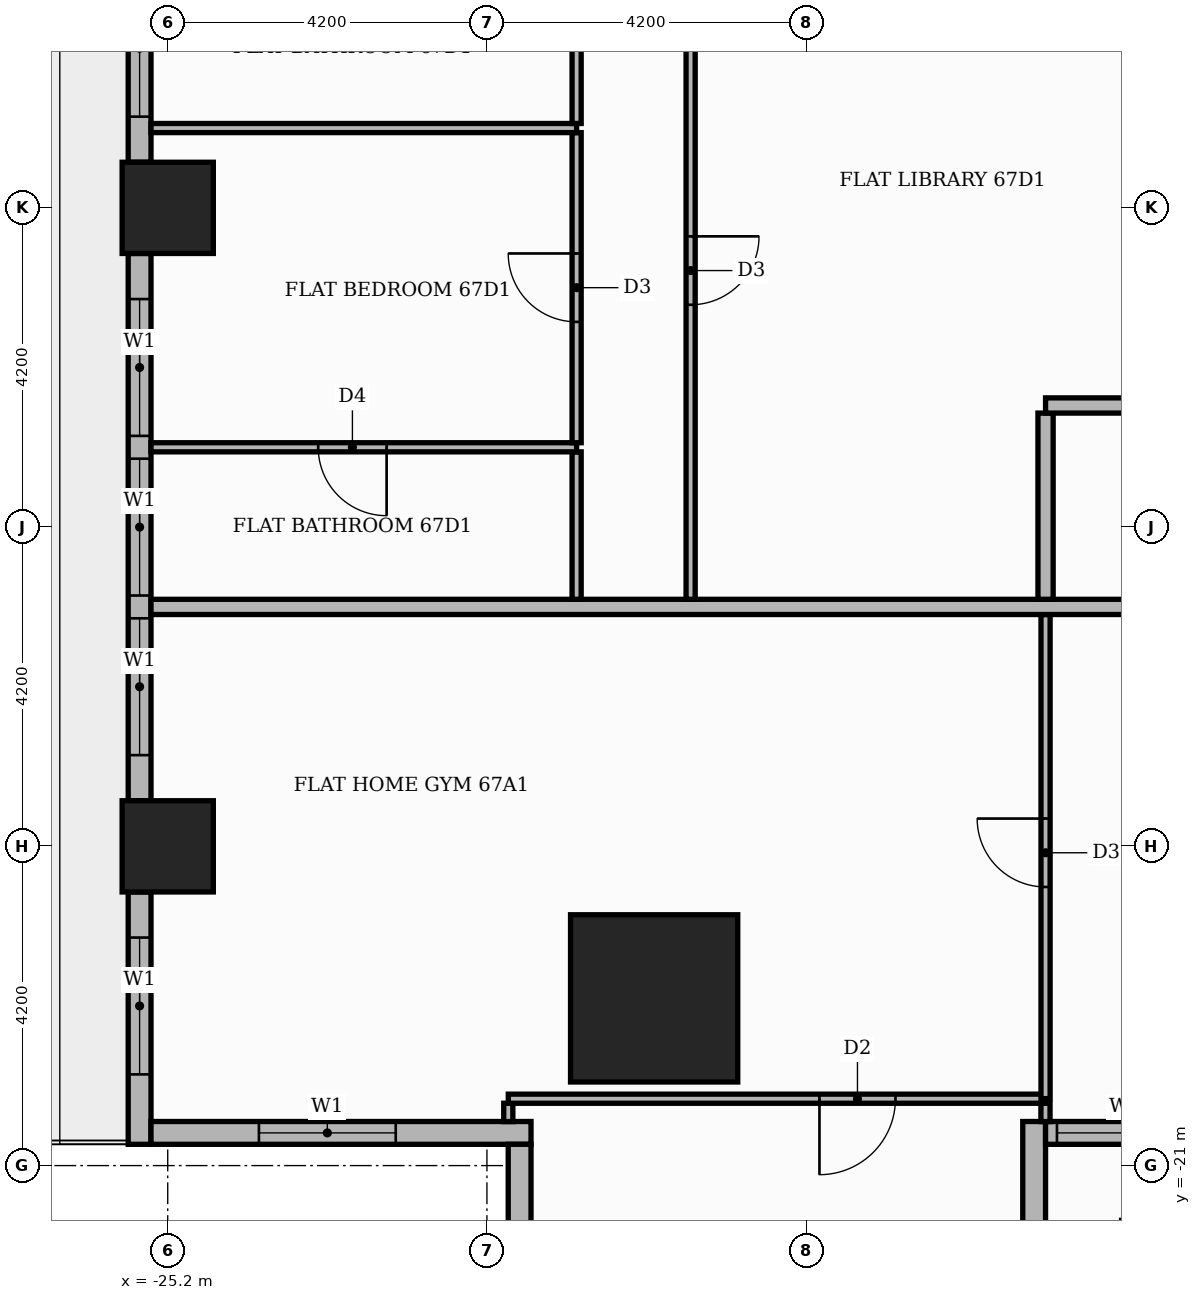
"""IFC4 building model, lengths in metres.
Left out: names, types, materials, properties, quantities, classifications, styles, units other than length and angle.
Written with IfcOpenShell. Run it as: python <this file> out.ifc"""

import sys

from ifc_helpers import new_model, si_unit, direction, frame, frame_2d, origin, origin_2d, place, context, subcontext, project, spatial, rectangle, extrude, element, fill, save


model = new_model("IFC4")
c1 = context("Model", 3, precision=1e-05, world=origin(), true_north=direction((0.0, 1.0)))
c2 = subcontext(c1, "Body", "Model", "MODEL_VIEW")
j1 = project(units=[si_unit("LENGTHUNIT", "METRE"), si_unit("PLANEANGLEUNIT", "RADIAN")], contexts=[c1])
p1 = place(None, origin())
s1 = spatial("IfcSite", under=j1, at=p1, CompositionType="ELEMENT")
p2 = place(p1, origin())
s2 = spatial("IfcBuilding", under=s1, at=p2, CompositionType="ELEMENT")
p3 = place(p2, frame((0.0, 0.0, 279.6)))
s3 = spatial("IfcBuildingStorey", under=s2, at=p3, CompositionType="ELEMENT", Elevation=279.6)
p4 = place(p3, frame((-18.8, -18.8, 0.0), z_axis=(0.0, 0.0, 1.0), x_axis=(1.0, 0.0, 0.0)))
e1 = element("IfcColumn", 1, at=p4, inside=s3, PredefinedType="COLUMN", context=c2, shape_type="SweptSolid", body=[
    extrude(rectangle(XDim=2.2, YDim=2.2, at=origin_2d()), origin(), (0.0, 0.0, 1.0), 3.9),
])
for number, where, z_axis, x_axis in (
    (2, (-25.2, -8.4, 0.0), (0.0, 0.0, 1.0), (1.0, 0.0, 0.0)),
    (3, (-25.2, -16.8, 0.0), (0.0, 0.0, 1.0), (1.0, 0.0, 0.0)),
):
    element("IfcColumn", number, at=place(p3, frame(where, z_axis=z_axis, x_axis=x_axis)), inside=s3, PredefinedType="COLUMN", context=c2, shape_type="SweptSolid", body=[
        extrude(rectangle(XDim=1.2, YDim=1.2, at=origin_2d()), origin(), (0.0, 0.0, 1.0), 3.9),
    ])
p5 = place(p3, frame((-25.57, -0.6, 0.0), z_axis=(0.0, 0.0, 1.0), x_axis=(0.0, -1.0, 0.0)))
e4 = element("IfcWall", 4, at=p5, inside=s3, PredefinedType="STANDARD", context=c2, shape_type="SweptSolid", body=[
    extrude(rectangle(XDim=7.2, YDim=0.3, at=frame_2d((3.6, 0.0))), origin(), (0.0, 0.0, 1.0), 3.48),
])
p6 = place(p5, frame((0.6, 0.0, 0.9)))
e5 = element("IfcOpeningElement", 5, at=p6, cuts=e4, PredefinedType="OPENING", context=c2, shape_type="SweptSolid", body=[
    extrude(rectangle(XDim=3.9, YDim=2.1, at=frame_2d((1.95, 1.05))), frame((0.0, 0.16, 0.0), z_axis=(0.0, -1.0, 0.0), x_axis=(1.0, 0.0, 0.0)), (0.0, 0.0, 1.0), 0.32),
])
p7 = place(p5, frame((4.8, 0.0, 0.9)))
e6 = element("IfcOpeningElement", 6, at=p7, cuts=e4, PredefinedType="OPENING", context=c2, shape_type="SweptSolid", body=[
    extrude(rectangle(XDim=1.8, YDim=2.1, at=frame_2d((0.9, 1.05))), frame((0.0, 0.16, 0.0), z_axis=(0.0, -1.0, 0.0), x_axis=(1.0, 0.0, 0.0)), (0.0, 0.0, 1.0), 0.32),
])
p8 = place(p3, frame((-25.57, -9.0, 0.0), z_axis=(0.0, 0.0, 1.0), x_axis=(0.0, -1.0, 0.0)))
e7 = element("IfcWall", 7, at=p8, inside=s3, PredefinedType="STANDARD", context=c2, shape_type="SweptSolid", body=[
    extrude(rectangle(XDim=7.2, YDim=0.3, at=frame_2d((3.6, 0.0))), origin(), (0.0, 0.0, 1.0), 3.48),
])
p9 = place(p8, frame((0.6, 0.0, 0.9)))
e8 = element("IfcOpeningElement", 8, at=p9, cuts=e7, PredefinedType="OPENING", context=c2, shape_type="SweptSolid", body=[
    extrude(rectangle(XDim=1.8, YDim=2.1, at=frame_2d((0.9, 1.05))), frame((0.0, 0.16, 0.0), z_axis=(0.0, -1.0, 0.0), x_axis=(1.0, 0.0, 0.0)), (0.0, 0.0, 1.0), 0.32),
])
p10 = place(p8, frame((2.7, 0.0, 0.9)))
e9 = element("IfcOpeningElement", 9, at=p10, cuts=e7, PredefinedType="OPENING", context=c2, shape_type="SweptSolid", body=[
    extrude(rectangle(XDim=1.8, YDim=2.1, at=frame_2d((0.9, 1.05))), frame((0.0, 0.16, 0.0), z_axis=(0.0, -1.0, 0.0), x_axis=(1.0, 0.0, 0.0)), (0.0, 0.0, 1.0), 0.32),
])
p11 = place(p8, frame((4.8, 0.0, 0.9)))
e10 = element("IfcOpeningElement", 10, at=p11, cuts=e7, PredefinedType="OPENING", context=c2, shape_type="SweptSolid", body=[
    extrude(rectangle(XDim=1.8, YDim=2.1, at=frame_2d((0.9, 1.05))), frame((0.0, 0.16, 0.0), z_axis=(0.0, -1.0, 0.0), x_axis=(1.0, 0.0, 0.0)), (0.0, 0.0, 1.0), 0.32),
])
p12 = place(p3, frame((-25.57, -17.4, 0.0), z_axis=(0.0, 0.0, 1.0), x_axis=(0.0, -1.0, 0.0)))
e11 = element("IfcWall", 11, at=p12, inside=s3, PredefinedType="STANDARD", context=c2, shape_type="SweptSolid", body=[
    extrude(rectangle(XDim=3.32, YDim=0.3, at=frame_2d((1.66, 0.0))), origin(), (0.0, 0.0, 1.0), 3.48),
])
p13 = place(p12, frame((0.6, 0.0, 0.9)))
e12 = element("IfcOpeningElement", 12, at=p13, cuts=e11, PredefinedType="OPENING", context=c2, shape_type="SweptSolid", body=[
    extrude(rectangle(XDim=1.8, YDim=2.1, at=frame_2d((0.9, 1.05))), frame((0.0, 0.16, 0.0), z_axis=(0.0, -1.0, 0.0), x_axis=(1.0, 0.0, 0.0)), (0.0, 0.0, 1.0), 0.32),
])
p14 = place(p3, frame((-25.42, -20.57, 0.0), z_axis=(0.0, 0.0, 1.0), x_axis=(1.0, 0.0, 0.0)))
e13 = element("IfcWall", 13, at=p14, inside=s3, PredefinedType="STANDARD", context=c2, shape_type="SweptSolid", body=[
    extrude(rectangle(XDim=5.0, YDim=0.3, at=frame_2d((2.5, 0.0))), origin(), (0.0, 0.0, 1.0), 3.48),
])
p15 = place(p14, frame((1.42, 0.0, 0.9)))
e14 = element("IfcOpeningElement", 14, at=p15, cuts=e13, PredefinedType="OPENING", context=c2, shape_type="SweptSolid", body=[
    extrude(rectangle(XDim=1.8, YDim=2.1, at=frame_2d((0.9, 1.05))), frame((0.0, 0.16, 0.0), z_axis=(0.0, -1.0, 0.0), x_axis=(1.0, 0.0, 0.0)), (0.0, 0.0, 1.0), 0.32),
])
p16 = place(p3, frame((-20.57, -20.72, 0.0), z_axis=(0.0, 0.0, 1.0), x_axis=(0.0, -1.0, 0.0)))
e15 = element("IfcWall", 15, at=p16, inside=s3, PredefinedType="STANDARD", context=c2, shape_type="SweptSolid", body=[
    extrude(rectangle(XDim=5.0, YDim=0.3, at=frame_2d((2.5, 0.0))), origin(), (0.0, 0.0, 1.0), 3.48),
])
p17 = place(p16, frame((1.48, 0.0, 0.9)))
e16 = element("IfcOpeningElement", 16, at=p17, cuts=e15, PredefinedType="OPENING", context=c2, shape_type="SweptSolid", body=[
    extrude(rectangle(XDim=1.8, YDim=2.1, at=frame_2d((0.9, 1.05))), frame((0.0, 0.16, 0.0), z_axis=(0.0, -1.0, 0.0), x_axis=(1.0, 0.0, 0.0)), (0.0, 0.0, 1.0), 0.32),
])
p18 = place(p3, frame((-13.8, -25.42, 0.0), z_axis=(0.0, 0.0, 1.0), x_axis=(0.0, 1.0, 0.0)))
e17 = element("IfcWall", 17, at=p18, inside=s3, PredefinedType="STANDARD", context=c2, shape_type="SweptSolid", body=[
    extrude(rectangle(XDim=5.0, YDim=0.3, at=frame_2d((2.5, 0.0))), origin(), (0.0, 0.0, 1.0), 3.48),
])
p19 = place(p18, frame((1.42, 0.0, 0.0)))
e18 = element("IfcOpeningElement", 18, at=p19, cuts=e17, PredefinedType="OPENING", context=c2, shape_type="SweptSolid", body=[
    extrude(rectangle(XDim=1.8, YDim=2.4, at=frame_2d((0.9, 1.2))), frame((0.0, 0.16, 0.0), z_axis=(0.0, -1.0, 0.0), x_axis=(1.0, 0.0, 0.0)), (0.0, 0.0, 1.0), 0.32),
])
p20 = place(p3, frame((-13.65, -20.57, 0.0), z_axis=(0.0, 0.0, 1.0), x_axis=(1.0, 0.0, 0.0)))
e19 = element("IfcWall", 19, at=p20, inside=s3, PredefinedType="STANDARD", context=c2, shape_type="SweptSolid", body=[
    extrude(rectangle(XDim=27.6, YDim=0.3, at=frame_2d((13.8, 0.0))), origin(), (0.0, 0.0, 1.0), 3.48),
])
p21 = place(p20, frame((0.15, 0.0, 0.9)))
e20 = element("IfcOpeningElement", 20, at=p21, cuts=e19, PredefinedType="OPENING", context=c2, shape_type="SweptSolid", body=[
    extrude(rectangle(XDim=1.8, YDim=2.1, at=frame_2d((0.9, 1.05))), frame((0.0, 0.16, 0.0), z_axis=(0.0, -1.0, 0.0), x_axis=(1.0, 0.0, 0.0)), (0.0, 0.0, 1.0), 0.32),
])
p22 = place(p20, frame((2.25, 0.0, 0.9)))
e21 = element("IfcOpeningElement", 21, at=p22, cuts=e19, PredefinedType="OPENING", context=c2, shape_type="SweptSolid", body=[
    extrude(rectangle(XDim=6.0, YDim=2.1, at=frame_2d((3.0, 1.05))), frame((0.0, 0.16, 0.0), z_axis=(0.0, -1.0, 0.0), x_axis=(1.0, 0.0, 0.0)), (0.0, 0.0, 1.0), 0.32),
])
p23 = place(p20, frame((8.55, 0.0, 0.9)))
e22 = element("IfcOpeningElement", 22, at=p23, cuts=e19, PredefinedType="OPENING", context=c2, shape_type="SweptSolid", body=[
    extrude(rectangle(XDim=6.0, YDim=2.1, at=frame_2d((3.0, 1.05))), frame((0.0, 0.16, 0.0), z_axis=(0.0, -1.0, 0.0), x_axis=(1.0, 0.0, 0.0)), (0.0, 0.0, 1.0), 0.32),
])
p24 = place(p20, frame((14.85, 0.0, 0.9)))
e23 = element("IfcOpeningElement", 23, at=p24, cuts=e19, PredefinedType="OPENING", context=c2, shape_type="SweptSolid", body=[
    extrude(rectangle(XDim=6.0, YDim=2.1, at=frame_2d((3.0, 1.05))), frame((0.0, 0.16, 0.0), z_axis=(0.0, -1.0, 0.0), x_axis=(1.0, 0.0, 0.0)), (0.0, 0.0, 1.0), 0.32),
])
p25 = place(p20, frame((21.15, 0.0, 0.9)))
e24 = element("IfcOpeningElement", 24, at=p25, cuts=e19, PredefinedType="OPENING", context=c2, shape_type="SweptSolid", body=[
    extrude(rectangle(XDim=6.0, YDim=2.1, at=frame_2d((3.0, 1.05))), frame((0.0, 0.16, 0.0), z_axis=(0.0, -1.0, 0.0), x_axis=(1.0, 0.0, 0.0)), (0.0, 0.0, 1.0), 0.32),
])
for number, where, z_axis, x_axis in (
    (25, (-20.719, -20.421, 0.0), (0.0, 0.0, 1.0), (0.0, 1.0, 0.0)),
    (26, (-13.651, -20.421, 0.0), (0.0, 0.0, 1.0), (0.0, 1.0, 0.0)),
):
    element("IfcWall", number, at=place(p3, frame(where, z_axis=z_axis, x_axis=x_axis)), inside=s3, PredefinedType="PARTITIONING", context=c2, shape_type="SweptSolid", body=[
        extrude(rectangle(XDim=0.241, YDim=0.12, at=frame_2d((0.121, 0.0))), origin(), (0.0, 0.0, 1.0), 3.48),
    ])
p26 = place(p3, frame((-20.719, -20.12, 0.0), z_axis=(0.0, 0.0, 1.0), x_axis=(1.0, 0.0, 0.0)))
e27 = element("IfcWall", 27, at=p26, inside=s3, PredefinedType="PARTITIONING", context=c2, shape_type="SweptSolid", body=[
    extrude(rectangle(XDim=7.068, YDim=0.12, at=frame_2d((3.534, 0.0))), origin(), (0.0, 0.0, 1.0), 3.48),
])
p27 = place(p26, frame((4.094, 0.0, 0.0)))
e28 = element("IfcOpeningElement", 28, at=p27, cuts=e27, PredefinedType="OPENING", context=c2, shape_type="SweptSolid", body=[
    extrude(rectangle(XDim=1.0, YDim=2.1, at=frame_2d((0.5, 1.05))), frame((0.0, 0.07, 0.0), z_axis=(0.0, -1.0, 0.0), x_axis=(1.0, 0.0, 0.0)), (0.0, 0.0, 1.0), 0.14),
])
p28 = place(p3, frame((-13.65, -20.119, 0.0), z_axis=(0.0, 0.0, 1.0), x_axis=(0.0, 1.0, 0.0)))
e29 = element("IfcWall", 29, at=p28, inside=s3, PredefinedType="PARTITIONING", context=c2, shape_type="SweptSolid", body=[
    extrude(rectangle(XDim=6.369, YDim=0.12, at=frame_2d((3.185, 0.0))), origin(), (0.0, 0.0, 1.0), 3.48),
])
p29 = place(p28, frame((2.784, 0.0, 0.0)))
e30 = element("IfcOpeningElement", 30, at=p29, cuts=e29, PredefinedType="OPENING", context=c2, shape_type="SweptSolid", body=[
    extrude(rectangle(XDim=0.9, YDim=2.1, at=frame_2d((0.45, 1.05))), frame((0.0, 0.07, 0.0), z_axis=(0.0, -1.0, 0.0), x_axis=(1.0, 0.0, 0.0)), (0.0, 0.0, 1.0), 0.14),
])
p30 = place(p3, frame((-25.42, -13.65, 0.0), z_axis=(0.0, 0.0, 1.0), x_axis=(1.0, 0.0, 0.0)))
e31 = element("IfcWall", 31, at=p30, inside=s3, PredefinedType="PARTITIONING", context=c2, shape_type="SweptSolid", body=[
    extrude(rectangle(XDim=39.07, YDim=0.2, at=frame_2d((19.535, 0.0))), origin(), (0.0, 0.0, 1.0), 3.48),
])
p31 = place(p30, frame((14.37, 0.0, 0.0)))
e32 = element("IfcOpeningElement", 32, at=p31, cuts=e31, PredefinedType="OPENING", context=c2, shape_type="SweptSolid", body=[
    extrude(rectangle(XDim=1.1, YDim=2.4, at=frame_2d((0.55, 1.2))), frame((0.0, 0.11, 0.0), z_axis=(0.0, -1.0, 0.0), x_axis=(1.0, 0.0, 0.0)), (0.0, 0.0, 1.0), 0.22),
])
p32 = place(p3, frame((-19.82, -13.55, 0.0), z_axis=(0.0, 0.0, 1.0), x_axis=(0.0, 1.0, 0.0)))
e33 = element("IfcWall", 33, at=p32, inside=s3, PredefinedType="PARTITIONING", context=c2, shape_type="SweptSolid", body=[
    extrude(rectangle(XDim=1.94, YDim=0.12, at=frame_2d((0.97, 0.0))), origin(), (0.0, 0.0, 1.0), 3.48),
])
p33 = place(p3, frame((-18.32, -13.55, 0.0), z_axis=(0.0, 0.0, 1.0), x_axis=(0.0, 1.0, 0.0)))
e34 = element("IfcWall", 34, at=p33, inside=s3, PredefinedType="PARTITIONING", context=c2, shape_type="SweptSolid", body=[
    extrude(rectangle(XDim=8.69, YDim=0.12, at=frame_2d((4.345, 0.0))), origin(), (0.0, 0.0, 1.0), 3.48),
])
p34 = place(p33, frame((3.875, 0.0, 0.0)))
e35 = element("IfcOpeningElement", 35, at=p34, cuts=e34, PredefinedType="OPENING", context=c2, shape_type="SweptSolid", body=[
    extrude(rectangle(XDim=0.9, YDim=2.1, at=frame_2d((0.45, 1.05))), frame((0.0, 0.07, 0.0), z_axis=(0.0, -1.0, 0.0), x_axis=(1.0, 0.0, 0.0)), (0.0, 0.0, 1.0), 0.14),
])
p35 = place(p3, frame((-13.65, -13.55, 0.0), z_axis=(0.0, 0.0, 1.0), x_axis=(0.0, 1.0, 0.0)))
e36 = element("IfcWall", 36, at=p35, inside=s3, PredefinedType="PARTITIONING", context=c2, shape_type="SweptSolid", body=[
    extrude(rectangle(XDim=2.45, YDim=0.2, at=frame_2d((1.225, 0.0))), origin(), (0.0, 0.0, 1.0), 3.48),
])
p36 = place(p3, frame((-25.42, -11.55, 0.0), z_axis=(0.0, 0.0, 1.0), x_axis=(1.0, 0.0, 0.0)))
e37 = element("IfcWall", 37, at=p36, inside=s3, PredefinedType="PARTITIONING", context=c2, shape_type="SweptSolid", body=[
    extrude(rectangle(XDim=5.6, YDim=0.12, at=frame_2d((2.8, 0.0))), origin(), (0.0, 0.0, 1.0), 3.48),
])
p37 = place(p36, frame((2.2, 0.0, 0.0)))
e38 = element("IfcOpeningElement", 38, at=p37, cuts=e37, PredefinedType="OPENING", context=c2, shape_type="SweptSolid", body=[
    extrude(rectangle(XDim=0.9, YDim=2.1, at=frame_2d((0.45, 1.05))), frame((0.0, 0.07, 0.0), z_axis=(0.0, -1.0, 0.0), x_axis=(1.0, 0.0, 0.0)), (0.0, 0.0, 1.0), 0.14),
])
p38 = place(p3, frame((-19.82, -11.49, 0.0), z_axis=(0.0, 0.0, 1.0), x_axis=(0.0, 1.0, 0.0)))
e39 = element("IfcWall", 39, at=p38, inside=s3, PredefinedType="PARTITIONING", context=c2, shape_type="SweptSolid", body=[
    extrude(rectangle(XDim=4.08, YDim=0.12, at=frame_2d((2.04, 0.0))), origin(), (0.0, 0.0, 1.0), 3.48),
])
p39 = place(p38, frame((1.59, 0.0, 0.0)))
e40 = element("IfcOpeningElement", 40, at=p39, cuts=e39, PredefinedType="OPENING", context=c2, shape_type="SweptSolid", body=[
    extrude(rectangle(XDim=0.9, YDim=2.1, at=frame_2d((0.45, 1.05))), frame((0.0, 0.07, 0.0), z_axis=(0.0, -1.0, 0.0), x_axis=(1.0, 0.0, 0.0)), (0.0, 0.0, 1.0), 0.14),
])
p40 = place(p3, frame((-13.65, -11.0, 0.0), z_axis=(0.0, 0.0, 1.0), x_axis=(1.0, 0.0, 0.0)))
e41 = element("IfcWall", 41, at=p40, inside=s3, PredefinedType="PARTITIONING", context=c2, shape_type="SweptSolid", body=[
    extrude(rectangle(XDim=2.65, YDim=0.2, at=frame_2d((1.325, 0.0))), origin(), (0.0, 0.0, 1.0), 3.48),
])
p41 = place(p3, frame((-25.42, -7.35, 0.0), z_axis=(0.0, 0.0, 1.0), x_axis=(1.0, 0.0, 0.0)))
e42 = element("IfcWall", 42, at=p41, inside=s3, PredefinedType="PARTITIONING", context=c2, shape_type="SweptSolid", body=[
    extrude(rectangle(XDim=5.6, YDim=0.12, at=frame_2d((2.8, 0.0))), origin(), (0.0, 0.0, 1.0), 3.48),
])
p42 = place(p3, frame((-19.82, -7.29, 0.0), z_axis=(0.0, 0.0, 1.0), x_axis=(0.0, 1.0, 0.0)))
e43 = element("IfcWall", 43, at=p42, inside=s3, PredefinedType="PARTITIONING", context=c2, shape_type="SweptSolid", body=[
    extrude(rectangle(XDim=1.98, YDim=0.12, at=frame_2d((0.99, 0.0))), origin(), (0.0, 0.0, 1.0), 3.48),
])
p43 = place(p7, origin())
e44 = element("IfcWindow", 44, at=p43, inside=s3, PartitioningType="SINGLE_PANEL", PredefinedType="WINDOW", context=c2, shape_type="SweptSolid", body=[
    extrude(rectangle(XDim=1.8, YDim=2.1, at=frame_2d((0.9, 1.05))), frame((0.0, 0.03, 0.0), z_axis=(0.0, -1.0, 0.0), x_axis=(1.0, 0.0, 0.0)), (0.0, 0.0, 1.0), 0.06),
])
fill(e6, e44)
p44 = place(p9, origin())
e45 = element("IfcWindow", 45, at=p44, inside=s3, PartitioningType="SINGLE_PANEL", PredefinedType="WINDOW", context=c2, shape_type="SweptSolid", body=[
    extrude(rectangle(XDim=1.8, YDim=2.1, at=frame_2d((0.9, 1.05))), frame((0.0, 0.03, 0.0), z_axis=(0.0, -1.0, 0.0), x_axis=(1.0, 0.0, 0.0)), (0.0, 0.0, 1.0), 0.06),
])
fill(e8, e45)
p45 = place(p10, origin())
e46 = element("IfcWindow", 46, at=p45, inside=s3, PartitioningType="SINGLE_PANEL", PredefinedType="WINDOW", context=c2, shape_type="SweptSolid", body=[
    extrude(rectangle(XDim=1.8, YDim=2.1, at=frame_2d((0.9, 1.05))), frame((0.0, 0.03, 0.0), z_axis=(0.0, -1.0, 0.0), x_axis=(1.0, 0.0, 0.0)), (0.0, 0.0, 1.0), 0.06),
])
fill(e9, e46)
p46 = place(p11, origin())
e47 = element("IfcWindow", 47, at=p46, inside=s3, PartitioningType="SINGLE_PANEL", PredefinedType="WINDOW", context=c2, shape_type="SweptSolid", body=[
    extrude(rectangle(XDim=1.8, YDim=2.1, at=frame_2d((0.9, 1.05))), frame((0.0, 0.03, 0.0), z_axis=(0.0, -1.0, 0.0), x_axis=(1.0, 0.0, 0.0)), (0.0, 0.0, 1.0), 0.06),
])
fill(e10, e47)
p47 = place(p13, origin())
e48 = element("IfcWindow", 48, at=p47, inside=s3, PartitioningType="SINGLE_PANEL", PredefinedType="WINDOW", context=c2, shape_type="SweptSolid", body=[
    extrude(rectangle(XDim=1.8, YDim=2.1, at=frame_2d((0.9, 1.05))), frame((0.0, 0.03, 0.0), z_axis=(0.0, -1.0, 0.0), x_axis=(1.0, 0.0, 0.0)), (0.0, 0.0, 1.0), 0.06),
])
fill(e12, e48)
p48 = place(p15, origin())
e49 = element("IfcWindow", 49, at=p48, inside=s3, PartitioningType="SINGLE_PANEL", PredefinedType="WINDOW", context=c2, shape_type="SweptSolid", body=[
    extrude(rectangle(XDim=1.8, YDim=2.1, at=frame_2d((0.9, 1.05))), frame((0.0, 0.03, 0.0), z_axis=(0.0, -1.0, 0.0), x_axis=(1.0, 0.0, 0.0)), (0.0, 0.0, 1.0), 0.06),
])
fill(e14, e49)
p49 = place(p21, origin())
e50 = element("IfcWindow", 50, at=p49, inside=s3, PartitioningType="SINGLE_PANEL", PredefinedType="WINDOW", context=c2, shape_type="SweptSolid", body=[
    extrude(rectangle(XDim=1.8, YDim=2.1, at=frame_2d((0.9, 1.05))), frame((0.0, 0.03, 0.0), z_axis=(0.0, -1.0, 0.0), x_axis=(1.0, 0.0, 0.0)), (0.0, 0.0, 1.0), 0.06),
])
fill(e20, e50)
p50 = place(p29, origin())
e51 = element("IfcDoor", 51, at=p50, inside=s3, OperationType="SINGLE_SWING_RIGHT", PredefinedType="DOOR", context=c2, shape_type="SweptSolid", body=[
    extrude(rectangle(XDim=0.9, YDim=2.1, at=frame_2d((0.45, 1.05))), frame((0.0, 0.025, 0.0), z_axis=(0.0, -1.0, 0.0), x_axis=(1.0, 0.0, 0.0)), (0.0, 0.0, 1.0), 0.05),
])
fill(e30, e51)
p51 = place(p27, frame((1.0, 0.0, 0.0), z_axis=(0.0, 0.0, 1.0), x_axis=(-1.0, 0.0, 0.0)))
e52 = element("IfcDoor", 52, at=p51, inside=s3, OperationType="SINGLE_SWING_LEFT", PredefinedType="DOOR", context=c2, shape_type="SweptSolid", body=[
    extrude(rectangle(XDim=1.0, YDim=2.1, at=frame_2d((0.5, 1.05))), frame((0.0, 0.025, 0.0), z_axis=(0.0, -1.0, 0.0), x_axis=(1.0, 0.0, 0.0)), (0.0, 0.0, 1.0), 0.05),
])
fill(e28, e52)
p52 = place(p34, frame((0.9, 0.0, 0.0), z_axis=(0.0, 0.0, 1.0), x_axis=(-1.0, 0.0, 0.0)))
e53 = element("IfcDoor", 53, at=p52, inside=s3, OperationType="SINGLE_SWING_RIGHT", PredefinedType="DOOR", context=c2, shape_type="SweptSolid", body=[
    extrude(rectangle(XDim=0.9, YDim=2.1, at=frame_2d((0.45, 1.05))), frame((0.0, 0.025, 0.0), z_axis=(0.0, -1.0, 0.0), x_axis=(1.0, 0.0, 0.0)), (0.0, 0.0, 1.0), 0.05),
])
fill(e35, e53)
p53 = place(p39, origin())
e54 = element("IfcDoor", 54, at=p53, inside=s3, OperationType="SINGLE_SWING_RIGHT", PredefinedType="DOOR", context=c2, shape_type="SweptSolid", body=[
    extrude(rectangle(XDim=0.9, YDim=2.1, at=frame_2d((0.45, 1.05))), frame((0.0, 0.025, 0.0), z_axis=(0.0, -1.0, 0.0), x_axis=(1.0, 0.0, 0.0)), (0.0, 0.0, 1.0), 0.05),
])
fill(e40, e54)
p54 = place(p37, frame((0.9, 0.0, 0.0), z_axis=(0.0, 0.0, 1.0), x_axis=(-1.0, 0.0, 0.0)))
e55 = element("IfcDoor", 55, at=p54, inside=s3, OperationType="SINGLE_SWING_RIGHT", PredefinedType="DOOR", context=c2, shape_type="SweptSolid", body=[
    extrude(rectangle(XDim=0.9, YDim=2.1, at=frame_2d((0.45, 1.05))), frame((0.0, 0.025, 0.0), z_axis=(0.0, -1.0, 0.0), x_axis=(1.0, 0.0, 0.0)), (0.0, 0.0, 1.0), 0.05),
])
fill(e38, e55)
save(model, sys.argv[1])
